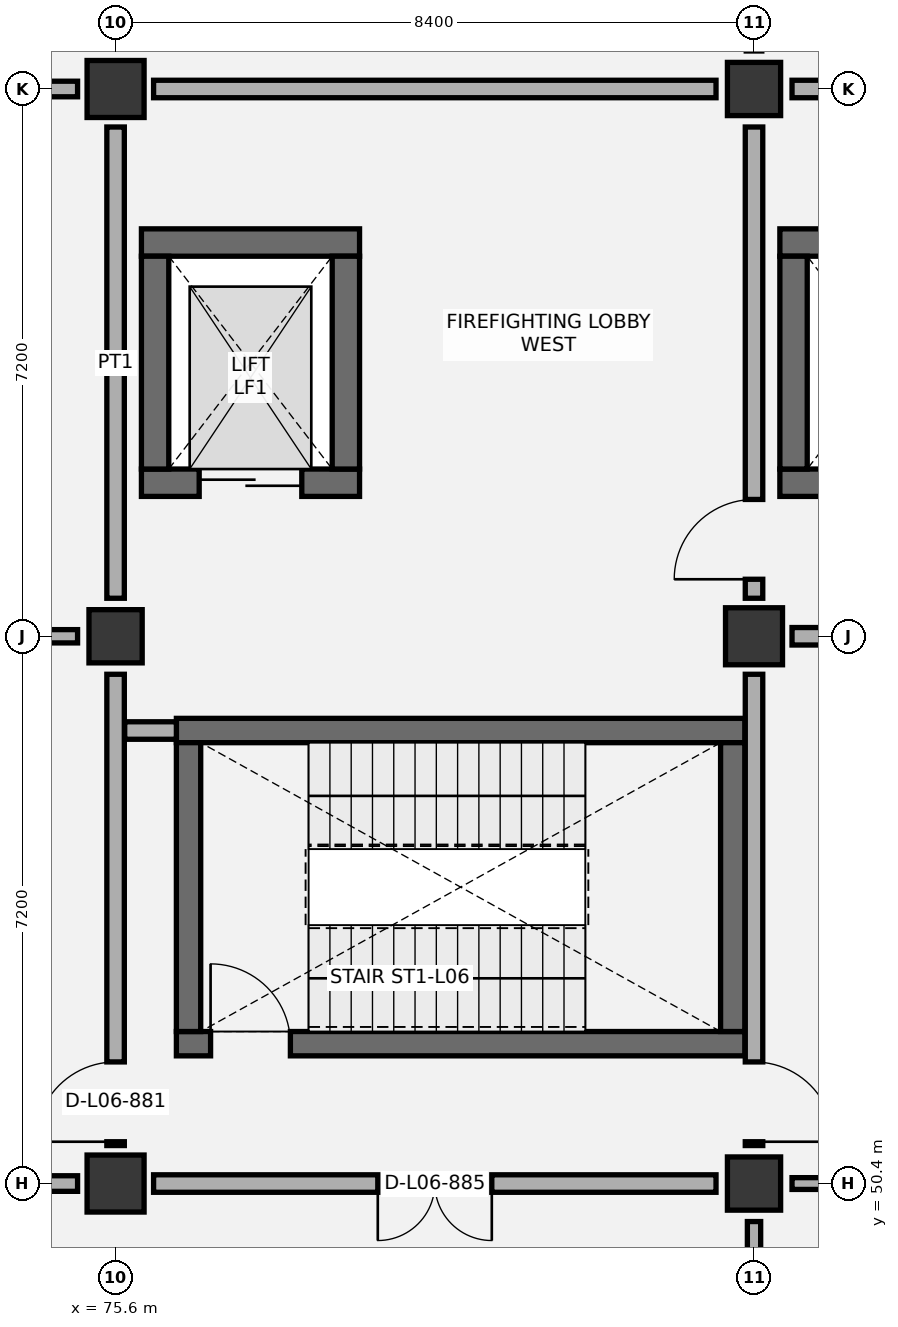
"""IFC4 building model, lengths in metres.
Left out: names, types, materials, properties, quantities, classifications, styles, units other than length and angle.
Written with IfcOpenShell. Run it as: python <this file> out.ifc"""

import sys

from ifc_helpers import new_model, si_unit, direction, frame, frame_2d, origin, origin_2d, place, context, subcontext, project, spatial, rectangle, extrude, element, fill, save


model = new_model("IFC4")
c1 = context("Model", 3, precision=1e-05, world=origin(), true_north=direction((0.0, 1.0)))
c2 = subcontext(c1, "Body", "Model", "MODEL_VIEW")
j1 = project(units=[si_unit("LENGTHUNIT", "METRE"), si_unit("PLANEANGLEUNIT", "RADIAN")], contexts=[c1])
p1 = place(None, origin())
s1 = spatial("IfcSite", under=j1, at=p1, CompositionType="ELEMENT")
p2 = place(p1, origin())
s2 = spatial("IfcBuilding", under=s1, at=p2, CompositionType="ELEMENT")
p3 = place(p2, frame((0.0, 0.0, 31.2)))
s3 = spatial("IfcBuildingStorey", under=s2, at=p3, CompositionType="ELEMENT", Elevation=31.2)
p4 = place(p3, frame((75.6, 50.4, 0.0), z_axis=(0.0, 0.0, 1.0), x_axis=(1.0, 0.0, 0.0)))
e1 = element("IfcColumn", 1, at=p4, inside=s3, PredefinedType="COLUMN", context=c2, shape_type="SweptSolid", body=[
    extrude(rectangle(XDim=0.75, YDim=0.75, at=origin_2d()), origin(), (0.0, 0.0, 1.0), 4.2),
])
p5 = place(p3, frame((75.6, 57.6, 0.0), z_axis=(0.0, 0.0, 1.0), x_axis=(1.0, 0.0, 0.0)))
e2 = element("IfcColumn", 2, at=p5, inside=s3, PredefinedType="COLUMN", context=c2, shape_type="SweptSolid", body=[
    extrude(rectangle(XDim=0.7, YDim=0.7, at=origin_2d()), origin(), (0.0, 0.0, 1.0), 4.2),
])
p6 = place(p3, frame((75.6, 64.8, 0.0), z_axis=(0.0, 0.0, 1.0), x_axis=(1.0, 0.0, 0.0)))
e3 = element("IfcColumn", 3, at=p6, inside=s3, PredefinedType="COLUMN", context=c2, shape_type="SweptSolid", body=[
    extrude(rectangle(XDim=0.75, YDim=0.75, at=origin_2d()), origin(), (0.0, 0.0, 1.0), 4.2),
])
p7 = place(p3, frame((84.0, 50.4, 0.0), z_axis=(0.0, 0.0, 1.0), x_axis=(1.0, 0.0, 0.0)))
e4 = element("IfcColumn", 4, at=p7, inside=s3, PredefinedType="COLUMN", context=c2, shape_type="SweptSolid", body=[
    extrude(rectangle(XDim=0.7, YDim=0.7, at=origin_2d()), origin(), (0.0, 0.0, 1.0), 4.2),
])
p8 = place(p3, frame((84.0, 57.6, 0.0), z_axis=(0.0, 0.0, 1.0), x_axis=(1.0, 0.0, 0.0)))
e5 = element("IfcColumn", 5, at=p8, inside=s3, PredefinedType="COLUMN", context=c2, shape_type="SweptSolid", body=[
    extrude(rectangle(XDim=0.75, YDim=0.75, at=origin_2d()), origin(), (0.0, 0.0, 1.0), 4.2),
])
p9 = place(p3, frame((84.0, 64.8, 0.0), z_axis=(0.0, 0.0, 1.0), x_axis=(1.0, 0.0, 0.0)))
e6 = element("IfcColumn", 6, at=p9, inside=s3, PredefinedType="COLUMN", context=c2, shape_type="SweptSolid", body=[
    extrude(rectangle(XDim=0.7, YDim=0.7, at=origin_2d()), origin(), (0.0, 0.0, 1.0), 4.2),
])
p10 = place(p3, frame((76.4, 52.24, 0.0), z_axis=(0.0, 0.0, 1.0), x_axis=(1.0, 0.0, 0.0)))
e7 = element("IfcWall", 7, at=p10, inside=s3, PredefinedType="SHEAR", context=c2, shape_type="SweptSolid", body=[
    extrude(rectangle(XDim=7.48, YDim=0.32, at=frame_2d((3.74, 0.0))), origin(), (0.0, 0.0, 1.0), 3.92),
])
p11 = place(p10, frame((0.45, 0.0, 0.0)))
e8 = element("IfcOpeningElement", 8, at=p11, cuts=e7, PredefinedType="OPENING", context=c2, shape_type="SweptSolid", body=[
    extrude(rectangle(XDim=1.05, YDim=2.15, at=frame_2d((0.525, 1.075))), frame((0.0, 0.17, 0.0), z_axis=(0.0, -1.0, 0.0), x_axis=(1.0, 0.0, 0.0)), (0.0, 0.0, 1.0), 0.34),
])
p12 = place(p3, frame((76.4, 56.36, 0.0), z_axis=(0.0, 0.0, 1.0), x_axis=(1.0, 0.0, 0.0)))
e9 = element("IfcWall", 9, at=p12, inside=s3, PredefinedType="SHEAR", context=c2, shape_type="SweptSolid", body=[
    extrude(rectangle(XDim=7.48, YDim=0.32, at=frame_2d((3.74, 0.0))), origin(), (0.0, 0.0, 1.0), 3.92),
])
for number, where, z_axis, x_axis in (
    (10, (76.56, 52.4, 0.0), (0.0, 0.0, 1.0), (0.0, 1.0, 0.0)),
    (11, (83.72, 52.4, 0.0), (0.0, 0.0, 1.0), (0.0, 1.0, 0.0)),
):
    element("IfcWall", number, at=place(p3, frame(where, z_axis=z_axis, x_axis=x_axis)), inside=s3, PredefinedType="SHEAR", context=c2, shape_type="SweptSolid", body=[
        extrude(rectangle(XDim=3.8, YDim=0.32, at=frame_2d((1.9, 0.0))), origin(), (0.0, 0.0, 1.0), 3.92),
    ])
p13 = place(p3, frame((75.94, 62.78, 0.0), z_axis=(0.0, 0.0, 1.0), x_axis=(1.0, 0.0, 0.0)))
e12 = element("IfcWall", 12, at=p13, inside=s3, PredefinedType="SHEAR", context=c2, shape_type="SweptSolid", body=[
    extrude(rectangle(XDim=2.87, YDim=0.36, at=frame_2d((1.435, 0.0))), origin(), (0.0, 0.0, 1.0), 3.92),
])
p14 = place(p3, frame((75.94, 59.62, 0.0), z_axis=(0.0, 0.0, 1.0), x_axis=(1.0, 0.0, 0.0)))
e13 = element("IfcWall", 13, at=p14, inside=s3, PredefinedType="SHEAR", context=c2, shape_type="SweptSolid", body=[
    extrude(rectangle(XDim=2.87, YDim=0.36, at=frame_2d((1.435, 0.0))), origin(), (0.0, 0.0, 1.0), 3.92),
])
p15 = place(p14, frame((0.76, 0.0, 0.0)))
e14 = element("IfcOpeningElement", 14, at=p15, cuts=e13, PredefinedType="OPENING", context=c2, shape_type="SweptSolid", body=[
    extrude(rectangle(XDim=1.35, YDim=2.2, at=frame_2d((0.675, 1.1))), frame((0.0, 0.19, 0.0), z_axis=(0.0, -1.0, 0.0), x_axis=(1.0, 0.0, 0.0)), (0.0, 0.0, 1.0), 0.38),
])
for number, where, z_axis, x_axis in (
    (15, (76.12, 59.8, 0.0), (0.0, 0.0, 1.0), (0.0, 1.0, 0.0)),
    (16, (78.63, 59.8, 0.0), (0.0, 0.0, 1.0), (0.0, 1.0, 0.0)),
):
    element("IfcWall", number, at=place(p3, frame(where, z_axis=z_axis, x_axis=x_axis)), inside=s3, PredefinedType="SHEAR", context=c2, shape_type="SweptSolid", body=[
        extrude(rectangle(XDim=2.8, YDim=0.36, at=frame_2d((1.4, 0.0))), origin(), (0.0, 0.0, 1.0), 3.92),
    ])
p16 = place(p3, frame((84.34, 62.78, 0.0), z_axis=(0.0, 0.0, 1.0), x_axis=(1.0, 0.0, 0.0)))
e17 = element("IfcWall", 17, at=p16, inside=s3, PredefinedType="SHEAR", context=c2, shape_type="SweptSolid", body=[
    extrude(rectangle(XDim=7.77, YDim=0.36, at=frame_2d((3.885, 0.0))), origin(), (0.0, 0.0, 1.0), 3.92),
])
p17 = place(p3, frame((84.34, 59.62, 0.0), z_axis=(0.0, 0.0, 1.0), x_axis=(1.0, 0.0, 0.0)))
e18 = element("IfcWall", 18, at=p17, inside=s3, PredefinedType="SHEAR", context=c2, shape_type="SweptSolid", body=[
    extrude(rectangle(XDim=2.66, YDim=0.36, at=frame_2d((1.33, 0.0))), origin(), (0.0, 0.0, 1.0), 3.92),
])
p18 = place(p17, frame((0.78, 0.0, 0.0)))
e19 = element("IfcOpeningElement", 19, at=p18, cuts=e18, PredefinedType="OPENING", context=c2, shape_type="SweptSolid", body=[
    extrude(rectangle(XDim=1.1, YDim=2.15, at=frame_2d((0.55, 1.075))), frame((0.0, 0.19, 0.0), z_axis=(0.0, -1.0, 0.0), x_axis=(1.0, 0.0, 0.0)), (0.0, 0.0, 1.0), 0.38),
])
p19 = place(p3, frame((84.52, 59.8, 0.0), z_axis=(0.0, 0.0, 1.0), x_axis=(0.0, 1.0, 0.0)))
e20 = element("IfcWall", 20, at=p19, inside=s3, PredefinedType="SHEAR", context=c2, shape_type="SweptSolid", body=[
    extrude(rectangle(XDim=2.8, YDim=0.36, at=frame_2d((1.4, 0.0))), origin(), (0.0, 0.0, 1.0), 3.92),
])
p20 = place(p3, frame((67.7, 50.4, 0.0), z_axis=(0.0, 0.0, 1.0), x_axis=(1.0, 0.0, 0.0)))
e21 = element("IfcWall", 21, at=p20, inside=s3, PredefinedType="PARTITIONING", context=c2, shape_type="SweptSolid", body=[
    extrude(rectangle(XDim=7.4, YDim=0.205, at=frame_2d((3.7, 0.0))), origin(), (0.0, 0.0, 1.0), 3.265),
])
p21 = place(p20, frame((2.95, 0.0, 0.0)))
e22 = element("IfcOpeningElement", 22, at=p21, cuts=e21, PredefinedType="OPENING", context=c2, shape_type="SweptSolid", body=[
    extrude(rectangle(XDim=1.5, YDim=2.2, at=frame_2d((0.75, 1.1))), frame((0.0, 0.113, 0.0), z_axis=(0.0, -1.0, 0.0), x_axis=(1.0, 0.0, 0.0)), (0.0, 0.0, 1.0), 0.225),
])
p22 = place(p3, frame((75.6, 50.9, 0.0), z_axis=(0.0, 0.0, 1.0), x_axis=(0.0, 1.0, 0.0)))
e23 = element("IfcWall", 23, at=p22, inside=s3, PredefinedType="PARTITIONING", context=c2, shape_type="SweptSolid", body=[
    extrude(rectangle(XDim=6.2, YDim=0.23, at=frame_2d((3.1, 0.0))), origin(), (0.0, 0.0, 1.0), 3.415),
])
p23 = place(p22, frame((0.05, 0.0, 0.0)))
e24 = element("IfcOpeningElement", 24, at=p23, cuts=e23, PredefinedType="OPENING", context=c2, shape_type="SweptSolid", body=[
    extrude(rectangle(XDim=1.05, YDim=2.15, at=frame_2d((0.525, 1.075))), frame((0.0, 0.125, 0.0), z_axis=(0.0, -1.0, 0.0), x_axis=(1.0, 0.0, 0.0)), (0.0, 0.0, 1.0), 0.25),
])
p24 = place(p3, frame((67.7, 57.6, 0.0), z_axis=(0.0, 0.0, 1.0), x_axis=(1.0, 0.0, 0.0)))
e25 = element("IfcWall", 25, at=p24, inside=s3, PredefinedType="PARTITIONING", context=c2, shape_type="SweptSolid", body=[
    extrude(rectangle(XDim=7.4, YDim=0.175, at=frame_2d((3.7, 0.0))), origin(), (0.0, 0.0, 1.0), 3.265),
])
p25 = place(p24, frame((2.975, 0.0, 0.0)))
e26 = element("IfcOpeningElement", 26, at=p25, cuts=e25, PredefinedType="OPENING", context=c2, shape_type="SweptSolid", body=[
    extrude(rectangle(XDim=1.45, YDim=2.2, at=frame_2d((0.725, 1.1))), frame((0.0, 0.097, 0.0), z_axis=(0.0, -1.0, 0.0), x_axis=(1.0, 0.0, 0.0)), (0.0, 0.0, 1.0), 0.195),
])
p26 = place(p3, frame((75.6, 58.1, 0.0), z_axis=(0.0, 0.0, 1.0), x_axis=(0.0, 1.0, 0.0)))
e27 = element("IfcWall", 27, at=p26, inside=s3, PredefinedType="PARTITIONING", context=c2, shape_type="SweptSolid", body=[
    extrude(rectangle(XDim=6.2, YDim=0.23, at=frame_2d((3.1, 0.0))), origin(), (0.0, 0.0, 1.0), 3.315),
])
p27 = place(p3, frame((67.7, 64.8, 0.0), z_axis=(0.0, 0.0, 1.0), x_axis=(1.0, 0.0, 0.0)))
e28 = element("IfcWall", 28, at=p27, inside=s3, PredefinedType="PARTITIONING", context=c2, shape_type="SweptSolid", body=[
    extrude(rectangle(XDim=7.4, YDim=0.205, at=frame_2d((3.7, 0.0))), origin(), (0.0, 0.0, 1.0), 3.265),
])
p28 = place(p27, frame((3.025, 0.0, 0.0)))
e29 = element("IfcOpeningElement", 29, at=p28, cuts=e28, PredefinedType="OPENING", context=c2, shape_type="SweptSolid", body=[
    extrude(rectangle(XDim=1.35, YDim=2.15, at=frame_2d((0.675, 1.075))), frame((0.0, 0.113, 0.0), z_axis=(0.0, -1.0, 0.0), x_axis=(1.0, 0.0, 0.0)), (0.0, 0.0, 1.0), 0.225),
])
p29 = place(p3, frame((84.0, 43.7, 0.0), z_axis=(0.0, 0.0, 1.0), x_axis=(0.0, 1.0, 0.0)))
e30 = element("IfcWall", 30, at=p29, inside=s3, PredefinedType="PARTITIONING", context=c2, shape_type="SweptSolid", body=[
    extrude(rectangle(XDim=6.2, YDim=0.175, at=frame_2d((3.1, 0.0))), origin(), (0.0, 0.0, 1.0), 3.415),
])
p30 = place(p29, frame((2.475, 0.0, 0.0)))
e31 = element("IfcOpeningElement", 31, at=p30, cuts=e30, PredefinedType="OPENING", context=c2, shape_type="SweptSolid", body=[
    extrude(rectangle(XDim=1.25, YDim=2.1, at=frame_2d((0.625, 1.05))), frame((0.0, 0.097, 0.0), z_axis=(0.0, -1.0, 0.0), x_axis=(1.0, 0.0, 0.0)), (0.0, 0.0, 1.0), 0.195),
])
p31 = place(p3, frame((76.1, 50.4, 0.0), z_axis=(0.0, 0.0, 1.0), x_axis=(1.0, 0.0, 0.0)))
e32 = element("IfcWall", 32, at=p31, inside=s3, PredefinedType="PARTITIONING", context=c2, shape_type="SweptSolid", body=[
    extrude(rectangle(XDim=7.4, YDim=0.23, at=frame_2d((3.7, 0.0))), origin(), (0.0, 0.0, 1.0), 3.265),
])
p32 = place(p31, frame((2.95, 0.0, 0.0)))
e33 = element("IfcOpeningElement", 33, at=p32, cuts=e32, PredefinedType="OPENING", context=c2, shape_type="SweptSolid", body=[
    extrude(rectangle(XDim=1.5, YDim=2.15, at=frame_2d((0.75, 1.075))), frame((0.0, 0.125, 0.0), z_axis=(0.0, -1.0, 0.0), x_axis=(1.0, 0.0, 0.0)), (0.0, 0.0, 1.0), 0.25),
])
p33 = place(p3, frame((84.0, 50.9, 0.0), z_axis=(0.0, 0.0, 1.0), x_axis=(0.0, 1.0, 0.0)))
e34 = element("IfcWall", 34, at=p33, inside=s3, PredefinedType="PARTITIONING", context=c2, shape_type="SweptSolid", body=[
    extrude(rectangle(XDim=6.2, YDim=0.23, at=frame_2d((3.1, 0.0))), origin(), (0.0, 0.0, 1.0), 3.315),
])
p34 = place(p33, frame((0.05, 0.0, 0.0)))
e35 = element("IfcOpeningElement", 35, at=p34, cuts=e34, PredefinedType="OPENING", context=c2, shape_type="SweptSolid", body=[
    extrude(rectangle(XDim=1.05, YDim=2.15, at=frame_2d((0.525, 1.075))), frame((0.0, 0.125, 0.0), z_axis=(0.0, -1.0, 0.0), x_axis=(1.0, 0.0, 0.0)), (0.0, 0.0, 1.0), 0.25),
])
p35 = place(p3, frame((75.72, 56.36, 0.0), z_axis=(0.0, 0.0, 1.0), x_axis=(1.0, 0.0, 0.0)))
e36 = element("IfcWall", 36, at=p35, inside=s3, PredefinedType="PARTITIONING", context=c2, shape_type="SweptSolid", body=[
    extrude(rectangle(XDim=0.68, YDim=0.23, at=frame_2d((0.34, 0.0))), origin(), (0.0, 0.0, 1.0), 3.92),
])
p36 = place(p3, frame((84.0, 58.1, 0.0), z_axis=(0.0, 0.0, 1.0), x_axis=(0.0, 1.0, 0.0)))
e37 = element("IfcWall", 37, at=p36, inside=s3, PredefinedType="PARTITIONING", context=c2, shape_type="SweptSolid", body=[
    extrude(rectangle(XDim=6.2, YDim=0.23, at=frame_2d((3.1, 0.0))), origin(), (0.0, 0.0, 1.0), 3.515),
])
p37 = place(p36, frame((0.25, 0.0, 0.0)))
e38 = element("IfcOpeningElement", 38, at=p37, cuts=e37, PredefinedType="OPENING", context=c2, shape_type="SweptSolid", body=[
    extrude(rectangle(XDim=1.05, YDim=2.15, at=frame_2d((0.525, 1.075))), frame((0.0, 0.125, 0.0), z_axis=(0.0, -1.0, 0.0), x_axis=(1.0, 0.0, 0.0)), (0.0, 0.0, 1.0), 0.25),
])
p38 = place(p3, frame((76.1, 64.8, 0.0), z_axis=(0.0, 0.0, 1.0), x_axis=(1.0, 0.0, 0.0)))
e39 = element("IfcWall", 39, at=p38, inside=s3, PredefinedType="PARTITIONING", context=c2, shape_type="SweptSolid", body=[
    extrude(rectangle(XDim=7.4, YDim=0.23, at=frame_2d((3.7, 0.0))), origin(), (0.0, 0.0, 1.0), 3.265),
])
p39 = place(p3, frame((84.5, 50.4, 0.0), z_axis=(0.0, 0.0, 1.0), x_axis=(1.0, 0.0, 0.0)))
e40 = element("IfcWall", 40, at=p39, inside=s3, PredefinedType="PARTITIONING", context=c2, shape_type="SweptSolid", body=[
    extrude(rectangle(XDim=7.4, YDim=0.155, at=frame_2d((3.7, 0.0))), origin(), (0.0, 0.0, 1.0), 3.265),
])
p40 = place(p39, frame((3.125, 0.0, 0.0)))
e41 = element("IfcOpeningElement", 41, at=p40, cuts=e40, PredefinedType="OPENING", context=c2, shape_type="SweptSolid", body=[
    extrude(rectangle(XDim=1.15, YDim=2.1, at=frame_2d((0.575, 1.05))), frame((0.0, 0.087, 0.0), z_axis=(0.0, -1.0, 0.0), x_axis=(1.0, 0.0, 0.0)), (0.0, 0.0, 1.0), 0.175),
])
p41 = place(p3, frame((84.5, 57.6, 0.0), z_axis=(0.0, 0.0, 1.0), x_axis=(1.0, 0.0, 0.0)))
e42 = element("IfcWall", 42, at=p41, inside=s3, PredefinedType="PARTITIONING", context=c2, shape_type="SweptSolid", body=[
    extrude(rectangle(XDim=7.4, YDim=0.23, at=frame_2d((3.7, 0.0))), origin(), (0.0, 0.0, 1.0), 3.265),
])
p42 = place(p41, frame((2.95, 0.0, 0.0)))
e43 = element("IfcOpeningElement", 43, at=p42, cuts=e42, PredefinedType="OPENING", context=c2, shape_type="SweptSolid", body=[
    extrude(rectangle(XDim=1.5, YDim=2.15, at=frame_2d((0.75, 1.075))), frame((0.0, 0.125, 0.0), z_axis=(0.0, -1.0, 0.0), x_axis=(1.0, 0.0, 0.0)), (0.0, 0.0, 1.0), 0.25),
])
p43 = place(p3, frame((84.5, 64.8, 0.0), z_axis=(0.0, 0.0, 1.0), x_axis=(1.0, 0.0, 0.0)))
e44 = element("IfcWall", 44, at=p43, inside=s3, PredefinedType="PARTITIONING", context=c2, shape_type="SweptSolid", body=[
    extrude(rectangle(XDim=7.4, YDim=0.23, at=frame_2d((3.7, 0.0))), origin(), (0.0, 0.0, 1.0), 3.265),
])
p44 = place(p11, origin())
e45 = element("IfcDoor", 45, at=p44, inside=s3, OperationType="SINGLE_SWING_LEFT", PredefinedType="DOOR", context=c2, shape_type="SweptSolid", body=[
    extrude(rectangle(XDim=1.05, YDim=2.15, at=frame_2d((0.525, 1.075))), frame((0.0, 0.025, 0.0), z_axis=(0.0, -1.0, 0.0), x_axis=(1.0, 0.0, 0.0)), (0.0, 0.0, 1.0), 0.05),
])
fill(e8, e45)
p45 = place(p15, origin())
e46 = element("IfcDoor", 46, at=p45, inside=s3, OperationType="DOUBLE_DOOR_SLIDING", PredefinedType="DOOR", context=c2, shape_type="SweptSolid", body=[
    extrude(rectangle(XDim=1.35, YDim=2.2, at=frame_2d((0.675, 1.1))), frame((0.0, 0.025, 0.0), z_axis=(0.0, -1.0, 0.0), x_axis=(1.0, 0.0, 0.0)), (0.0, 0.0, 1.0), 0.05),
])
fill(e14, e46)
p46 = place(p23, origin())
e47 = element("IfcDoor", 47, at=p46, inside=s3, OperationType="SINGLE_SWING_LEFT", PredefinedType="DOOR", context=c2, shape_type="SweptSolid", body=[
    extrude(rectangle(XDim=1.05, YDim=2.15, at=frame_2d((0.525, 1.075))), frame((0.0, 0.025, 0.0), z_axis=(0.0, -1.0, 0.0), x_axis=(1.0, 0.0, 0.0)), (0.0, 0.0, 1.0), 0.05),
])
fill(e24, e47)
p47 = place(p32, frame((1.5, 0.0, 0.0), z_axis=(0.0, 0.0, 1.0), x_axis=(-1.0, 0.0, 0.0)))
e48 = element("IfcDoor", 48, at=p47, inside=s3, OperationType="DOUBLE_DOOR_SINGLE_SWING", PredefinedType="DOOR", context=c2, shape_type="SweptSolid", body=[
    extrude(rectangle(XDim=1.5, YDim=2.15, at=frame_2d((0.75, 1.075))), frame((0.0, 0.025, 0.0), z_axis=(0.0, -1.0, 0.0), x_axis=(1.0, 0.0, 0.0)), (0.0, 0.0, 1.0), 0.05),
])
fill(e33, e48)
p48 = place(p34, frame((1.05, 0.0, 0.0), z_axis=(0.0, 0.0, 1.0), x_axis=(-1.0, 0.0, 0.0)))
e49 = element("IfcDoor", 49, at=p48, inside=s3, OperationType="SINGLE_SWING_RIGHT", PredefinedType="DOOR", context=c2, shape_type="SweptSolid", body=[
    extrude(rectangle(XDim=1.05, YDim=2.15, at=frame_2d((0.525, 1.075))), frame((0.0, 0.025, 0.0), z_axis=(0.0, -1.0, 0.0), x_axis=(1.0, 0.0, 0.0)), (0.0, 0.0, 1.0), 0.05),
])
fill(e35, e49)
p49 = place(p37, origin())
e50 = element("IfcDoor", 50, at=p49, inside=s3, OperationType="SINGLE_SWING_LEFT", PredefinedType="DOOR", context=c2, shape_type="SweptSolid", body=[
    extrude(rectangle(XDim=1.05, YDim=2.15, at=frame_2d((0.525, 1.075))), frame((0.0, 0.025, 0.0), z_axis=(0.0, -1.0, 0.0), x_axis=(1.0, 0.0, 0.0)), (0.0, 0.0, 1.0), 0.05),
])
fill(e38, e50)
save(model, sys.argv[1])
